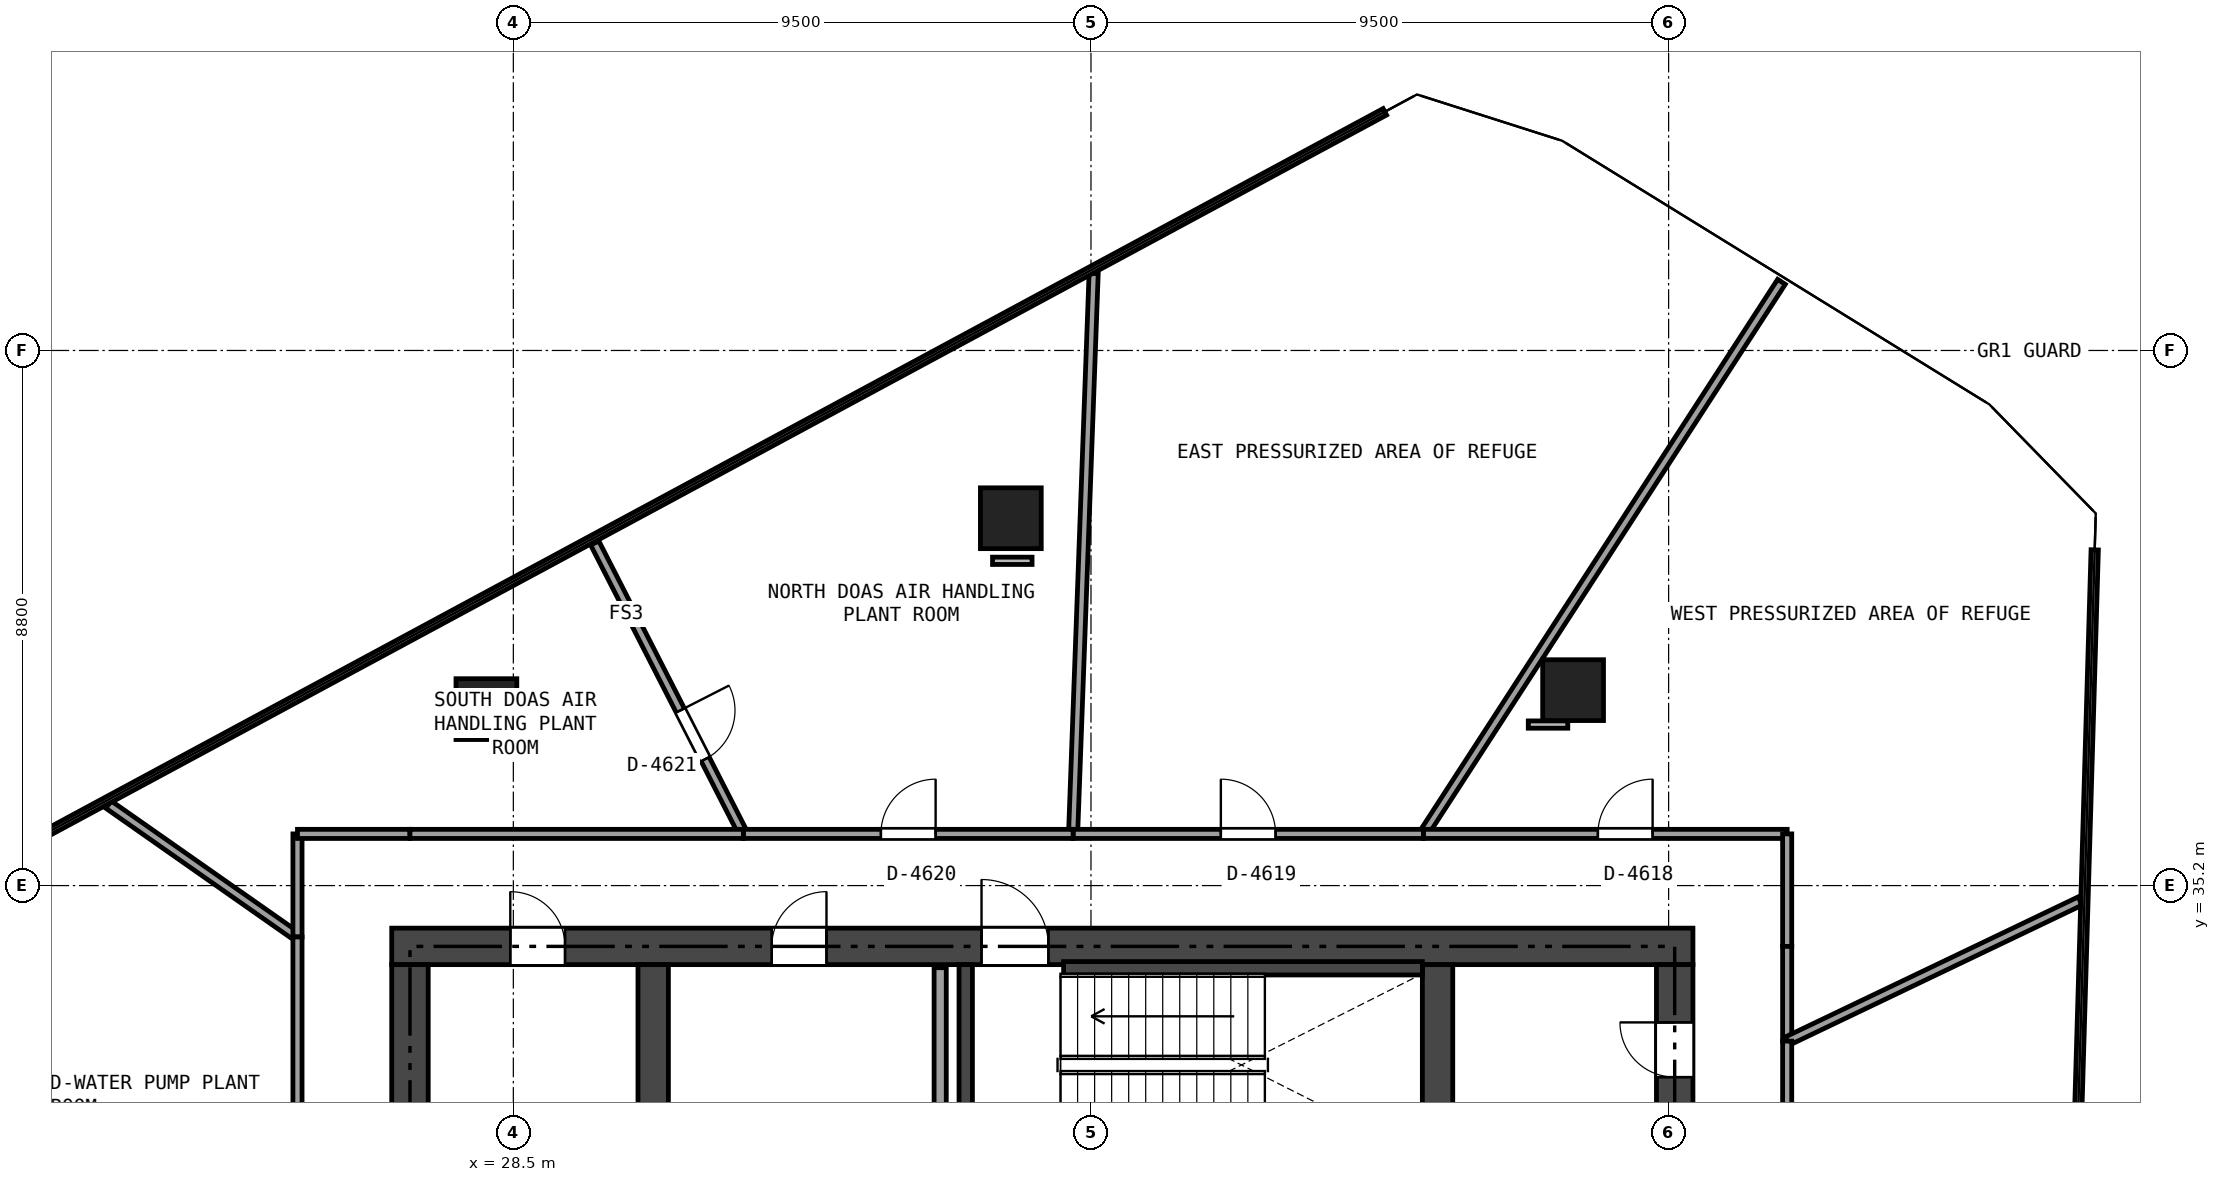
"""IFC4 building model, lengths in metres.
Left out: names, types, materials, properties, quantities, classifications, styles, units other than length and angle.
Written with IfcOpenShell. Run it as: python <this file> out.ifc"""

import sys

from ifc_helpers import new_model, si_unit, direction, frame, frame_2d, origin, origin_2d, place, context, subcontext, project, spatial, rectangle, extrude, element, fill, save


model = new_model("IFC4")
c1 = context("Model", 3, precision=1e-05, world=origin(), true_north=direction((0.0, 1.0)))
c2 = subcontext(c1, "Body", "Model", "MODEL_VIEW")
j1 = project(units=[si_unit("LENGTHUNIT", "METRE"), si_unit("PLANEANGLEUNIT", "RADIAN")], contexts=[c1])
p1 = place(None, origin())
s1 = spatial("IfcSite", under=j1, at=p1, CompositionType="ELEMENT")
p2 = place(p1, origin())
s2 = spatial("IfcBuilding", under=s1, at=p2, CompositionType="ELEMENT")
p3 = place(p2, frame((0.0, 0.0, 172.5)))
s3 = spatial("IfcBuildingStorey", under=s2, at=p3, CompositionType="ELEMENT", Elevation=172.5)
p4 = place(p3, frame((26.5, 34.2, 0.0), z_axis=(0.0, 0.0, 1.0), x_axis=(1.0, 0.0, 0.0)))
e1 = element("IfcWall", 1, at=p4, inside=s3, PredefinedType="SHEAR", context=c2, shape_type="SweptSolid", body=[
    extrude(rectangle(XDim=21.4, YDim=0.6, at=frame_2d((10.7, 0.0))), origin(), (0.0, 0.0, 1.0), 4.08),
])
p5 = place(p4, frame((9.7, 0.0, 0.0)))
e2 = element("IfcOpeningElement", 2, at=p5, cuts=e1, PredefinedType="OPENING", context=c2, shape_type="SweptSolid", body=[
    extrude(rectangle(XDim=1.1, YDim=2.15, at=frame_2d((0.55, 1.075))), frame((0.0, 0.31, 0.0), z_axis=(0.0, -1.0, 0.0), x_axis=(1.0, 0.0, 0.0)), (0.0, 0.0, 1.0), 0.62),
])
p6 = place(p4, frame((1.95, 0.0, 0.0)))
e3 = element("IfcOpeningElement", 3, at=p6, cuts=e1, PredefinedType="OPENING", context=c2, shape_type="SweptSolid", body=[
    extrude(rectangle(XDim=0.9, YDim=2.1, at=frame_2d((0.45, 1.05))), frame((0.0, 0.31, 0.0), z_axis=(0.0, -1.0, 0.0), x_axis=(1.0, 0.0, 0.0)), (0.0, 0.0, 1.0), 0.62),
])
p7 = place(p4, frame((6.25, 0.0, 0.0)))
e4 = element("IfcOpeningElement", 4, at=p7, cuts=e1, PredefinedType="OPENING", context=c2, shape_type="SweptSolid", body=[
    extrude(rectangle(XDim=0.9, YDim=2.1, at=frame_2d((0.45, 1.05))), frame((0.0, 0.31, 0.0), z_axis=(0.0, -1.0, 0.0), x_axis=(1.0, 0.0, 0.0)), (0.0, 0.0, 1.0), 0.62),
])
p8 = place(p3, frame((26.8, 18.9, 0.0), z_axis=(0.0, 0.0, 1.0), x_axis=(0.0, 1.0, 0.0)))
e5 = element("IfcWall", 5, at=p8, inside=s3, PredefinedType="SHEAR", context=c2, shape_type="SweptSolid", body=[
    extrude(rectangle(XDim=15.0, YDim=0.6, at=frame_2d((7.5, 0.0))), origin(), (0.0, 0.0, 1.0), 4.08),
])
p9 = place(p8, frame((4.6, 0.0, 0.02)))
e6 = element("IfcOpeningElement", 6, at=p9, cuts=e5, PredefinedType="OPENING", context=c2, shape_type="SweptSolid", body=[
    extrude(rectangle(XDim=0.9, YDim=2.02, at=frame_2d((0.45, 1.01))), frame((0.0, 0.31, 0.0), z_axis=(0.0, -1.0, 0.0), x_axis=(1.0, 0.0, 0.0)), (0.0, 0.0, 1.0), 0.62),
])
p10 = place(p3, frame((47.6, 18.9, 0.0), z_axis=(0.0, 0.0, 1.0), x_axis=(0.0, 1.0, 0.0)))
e7 = element("IfcWall", 7, at=p10, inside=s3, PredefinedType="SHEAR", context=c2, shape_type="SweptSolid", body=[
    extrude(rectangle(XDim=15.0, YDim=0.6, at=frame_2d((7.5, 0.0))), origin(), (0.0, 0.0, 1.0), 4.08),
])
p11 = place(p10, frame((6.6, 0.0, 0.0)))
e8 = element("IfcOpeningElement", 8, at=p11, cuts=e7, PredefinedType="OPENING", context=c2, shape_type="SweptSolid", body=[
    extrude(rectangle(XDim=1.1, YDim=2.15, at=frame_2d((0.55, 1.075))), frame((0.0, 0.31, 0.0), z_axis=(0.0, -1.0, 0.0), x_axis=(1.0, 0.0, 0.0)), (0.0, 0.0, 1.0), 0.62),
])
p12 = place(p10, frame((8.5, 0.0, 0.0)))
e9 = element("IfcOpeningElement", 9, at=p12, cuts=e7, PredefinedType="OPENING", context=c2, shape_type="SweptSolid", body=[
    extrude(rectangle(XDim=0.9, YDim=2.1, at=frame_2d((0.45, 1.05))), frame((0.0, 0.31, 0.0), z_axis=(0.0, -1.0, 0.0), x_axis=(1.0, 0.0, 0.0)), (0.0, 0.0, 1.0), 0.62),
])
p13 = place(p10, frame((13.15, 0.0, 0.0)))
e10 = element("IfcOpeningElement", 10, at=p13, cuts=e7, PredefinedType="OPENING", context=c2, shape_type="SweptSolid", body=[
    extrude(rectangle(XDim=0.9, YDim=2.1, at=frame_2d((0.45, 1.05))), frame((0.0, 0.31, 0.0), z_axis=(0.0, -1.0, 0.0), x_axis=(1.0, 0.0, 0.0)), (0.0, 0.0, 1.0), 0.62),
])
p14 = place(p3, frame((30.8, 18.9, 0.0), z_axis=(0.0, 0.0, 1.0), x_axis=(0.0, 1.0, 0.0)))
e11 = element("IfcWall", 11, at=p14, inside=s3, PredefinedType="SHEAR", context=c2, shape_type="SweptSolid", body=[
    extrude(rectangle(XDim=15.0, YDim=0.5, at=frame_2d((7.5, 0.0))), origin(), (0.0, 0.0, 1.0), 4.08),
])
p15 = place(p14, frame((6.6, 0.0, 0.0)))
e12 = element("IfcOpeningElement", 12, at=p15, cuts=e11, PredefinedType="OPENING", context=c2, shape_type="SweptSolid", body=[
    extrude(rectangle(XDim=1.1, YDim=2.15, at=frame_2d((0.55, 1.075))), frame((0.0, 0.26, 0.0), z_axis=(0.0, -1.0, 0.0), x_axis=(1.0, 0.0, 0.0)), (0.0, 0.0, 1.0), 0.52),
])
p16 = place(p14, frame((8.4, 0.0, 0.0)))
e13 = element("IfcOpeningElement", 13, at=p16, cuts=e11, PredefinedType="OPENING", context=c2, shape_type="SweptSolid", body=[
    extrude(rectangle(XDim=0.9, YDim=2.1, at=frame_2d((0.45, 1.05))), frame((0.0, 0.26, 0.0), z_axis=(0.0, -1.0, 0.0), x_axis=(1.0, 0.0, 0.0)), (0.0, 0.0, 1.0), 0.52),
])
p17 = place(p3, frame((43.7, 18.9, 0.0), z_axis=(0.0, 0.0, 1.0), x_axis=(0.0, 1.0, 0.0)))
e14 = element("IfcWall", 14, at=p17, inside=s3, PredefinedType="SHEAR", context=c2, shape_type="SweptSolid", body=[
    extrude(rectangle(XDim=15.0, YDim=0.5, at=frame_2d((7.5, 0.0))), origin(), (0.0, 0.0, 1.0), 4.08),
])
p18 = place(p17, frame((8.1, 0.0, 0.0)))
e15 = element("IfcOpeningElement", 15, at=p18, cuts=e14, PredefinedType="OPENING", context=c2, shape_type="SweptSolid", body=[
    extrude(rectangle(XDim=0.9, YDim=2.1, at=frame_2d((0.45, 1.05))), frame((0.0, 0.26, 0.0), z_axis=(0.0, -1.0, 0.0), x_axis=(1.0, 0.0, 0.0)), (0.0, 0.0, 1.0), 0.52),
])
p19 = place(p3, frame((35.94, 30.75, 0.0), z_axis=(0.0, 0.0, 1.0), x_axis=(0.0, 1.0, 0.0)))
e16 = element("IfcWall", 16, at=p19, inside=s3, PredefinedType="SHEAR", context=c2, shape_type="SweptSolid", body=[
    extrude(rectangle(XDim=3.15, YDim=0.22, at=frame_2d((1.575, 0.0))), origin(), (0.0, 0.0, 1.0), 4.08),
])
p20 = place(p3, frame((37.55, 33.84, 0.0), z_axis=(0.0, 0.0, 1.0), x_axis=(1.0, 0.0, 0.0)))
e17 = element("IfcWall", 17, at=p20, inside=s3, PredefinedType="SHEAR", context=c2, shape_type="SweptSolid", body=[
    extrude(rectangle(XDim=5.9, YDim=0.22, at=frame_2d((2.95, 0.0))), origin(), (0.0, 0.0, 1.0), 4.08),
])
for number, where, z_axis, x_axis in (
    (18, (45.929, 38.414, 0.0), (0.0, 0.0, 1.0), (1.0, 0.0, 0.0)),
    (19, (36.682, 41.241, 0.0), (0.0, 0.0, 1.0), (1.0, 0.0, 0.0)),
    (20, (28.057, 38.102, 0.0), (0.0, 0.0, 1.0), (1.0, 0.0, 0.0)),
):
    element("IfcColumn", number, at=place(p3, frame(where, z_axis=z_axis, x_axis=x_axis)), inside=s3, PredefinedType="COLUMN", context=c2, shape_type="SweptSolid", body=[
        extrude(rectangle(XDim=1.0, YDim=1.0, at=origin_2d()), origin(), (0.0, 0.0, 1.0), 4.08),
    ])
p21 = place(p3, frame((35.52, 18.95, 0.0), z_axis=(0.0, 0.0, 1.0), x_axis=(0.0, 1.0, 0.0)))
e21 = element("IfcWall", 21, at=p21, inside=s3, PredefinedType="SOLIDWALL", context=c2, shape_type="SweptSolid", body=[
    extrude(rectangle(XDim=14.9, YDim=0.2, at=frame_2d((7.45, 0.0))), origin(), (0.0, 0.0, 1.0), 3.601),
])
p22 = place(p21, frame((7.755, 0.0, 0.0)))
e22 = element("IfcOpeningElement", 22, at=p22, cuts=e21, PredefinedType="OPENING", context=c2, shape_type="SweptSolid", body=[
    extrude(rectangle(XDim=0.95, YDim=2.15, at=frame_2d((0.475, 1.075))), frame((0.0, 0.11, 0.0), z_axis=(0.0, -1.0, 0.0), x_axis=(1.0, 0.0, 0.0)), (0.0, 0.0, 1.0), 0.22),
])
p23 = place(p21, frame((0.6, 0.0, 0.0)))
e23 = element("IfcOpeningElement", 23, at=p23, cuts=e21, PredefinedType="OPENING", context=c2, shape_type="SweptSolid", body=[
    extrude(rectangle(XDim=0.9, YDim=2.1, at=frame_2d((0.45, 1.05))), frame((0.0, 0.11, 0.0), z_axis=(0.0, -1.0, 0.0), x_axis=(1.0, 0.0, 0.0)), (0.0, 0.0, 1.0), 0.22),
])
p24 = place(p3, frame((49.356, 45.129, 0.0), z_axis=(0.0, 0.0, 1.0), x_axis=(-0.544186384165, -0.838964349236, 0.0)))
e24 = element("IfcWall", 24, at=p24, inside=s3, PredefinedType="PARTITIONING", context=c2, shape_type="SweptSolid", body=[
    extrude(rectangle(XDim=10.822, YDim=0.15, at=frame_2d((5.411, 0.0))), origin(), (0.0, 0.0, 1.0), 3.565),
])
p25 = place(p3, frame((43.467, 36.05, 0.0), z_axis=(0.0, 0.0, 1.0), x_axis=(1.0, 0.0, 0.0)))
e25 = element("IfcWall", 25, at=p25, inside=s3, PredefinedType="PARTITIONING", context=c2, shape_type="SweptSolid", body=[
    extrude(rectangle(XDim=5.983, YDim=0.15, at=frame_2d((2.991, 0.0))), origin(), (0.0, 0.0, 1.0), 3.065),
])
p26 = place(p25, frame((2.87, 0.0, 0.0)))
e26 = element("IfcOpeningElement", 26, at=p26, cuts=e25, PredefinedType="OPENING", context=c2, shape_type="SweptSolid", body=[
    extrude(rectangle(XDim=0.9, YDim=2.0, at=frame_2d((0.45, 1.0))), frame((0.0, 0.085, 0.0), z_axis=(0.0, -1.0, 0.0), x_axis=(1.0, 0.0, 0.0)), (0.0, 0.0, 1.0), 0.17),
])
p27 = place(p3, frame((49.45, 36.05, 0.0), z_axis=(0.0, 0.0, 1.0), x_axis=(0.0, -1.0, 0.0)))
e27 = element("IfcWall", 27, at=p27, inside=s3, PredefinedType="PARTITIONING", context=c2, shape_type="SweptSolid", body=[
    extrude(rectangle(XDim=1.85, YDim=0.15, at=frame_2d((0.925, 0.0))), origin(), (0.0, 0.0, 1.0), 4.08),
])
p28 = place(p3, frame((49.45, 34.2, 0.0), z_axis=(0.0, 0.0, 1.0), x_axis=(0.0, -1.0, 0.0)))
e28 = element("IfcWall", 28, at=p28, inside=s3, PredefinedType="PARTITIONING", context=c2, shape_type="SweptSolid", body=[
    extrude(rectangle(XDim=1.558, YDim=0.15, at=frame_2d((0.779, 0.0))), origin(), (0.0, 0.0, 1.0), 3.565),
])
p29 = place(p3, frame((49.45, 32.642, 0.0), z_axis=(0.0, 0.0, 1.0), x_axis=(0.902160522938, 0.431400499365, 0.0)))
e29 = element("IfcWall", 29, at=p29, inside=s3, PredefinedType="PARTITIONING", context=c2, shape_type="SweptSolid", body=[
    extrude(rectangle(XDim=5.341, YDim=0.15, at=frame_2d((2.67, 0.0))), origin(), (0.0, 0.0, 1.0), 3.565),
])
p30 = place(p3, frame((38.044, 45.267, 0.0), z_axis=(0.0, 0.0, 1.0), x_axis=(-0.036634729759, -0.999328722981, 0.0)))
e30 = element("IfcWall", 30, at=p30, inside=s3, PredefinedType="PARTITIONING", context=c2, shape_type="SweptSolid", body=[
    extrude(rectangle(XDim=9.223, YDim=0.15, at=frame_2d((4.612, 0.0))), origin(), (0.0, 0.0, 1.0), 3.565),
])
p31 = place(p3, frame((37.706, 36.05, 0.0), z_axis=(0.0, 0.0, 1.0), x_axis=(1.0, 0.0, 0.0)))
e31 = element("IfcWall", 31, at=p31, inside=s3, PredefinedType="PARTITIONING", context=c2, shape_type="SweptSolid", body=[
    extrude(rectangle(XDim=5.761, YDim=0.15, at=frame_2d((2.88, 0.0))), origin(), (0.0, 0.0, 1.0), 3.601),
])
p32 = place(p31, frame((2.43, 0.0, 0.0)))
e32 = element("IfcOpeningElement", 32, at=p32, cuts=e31, PredefinedType="OPENING", context=c2, shape_type="SweptSolid", body=[
    extrude(rectangle(XDim=0.9, YDim=2.0, at=frame_2d((0.45, 1.0))), frame((0.0, 0.085, 0.0), z_axis=(0.0, -1.0, 0.0), x_axis=(1.0, 0.0, 0.0)), (0.0, 0.0, 1.0), 0.17),
])
p33 = place(p3, frame((29.839, 40.833, 0.0), z_axis=(0.0, 0.0, 1.0), x_axis=(0.454996530665, -0.890493210015, 0.0)))
e33 = element("IfcWall", 33, at=p33, inside=s3, PredefinedType="PARTITIONING", context=c2, shape_type="SweptSolid", body=[
    extrude(rectangle(XDim=5.371, YDim=0.15, at=frame_2d((2.686, 0.0))), origin(), (0.0, 0.0, 1.0), 3.565),
])
p34 = place(p33, frame((3.091, 0.0, 0.0)))
e34 = element("IfcOpeningElement", 34, at=p34, cuts=e33, PredefinedType="OPENING", context=c2, shape_type="SweptSolid", body=[
    extrude(rectangle(XDim=0.9, YDim=2.0, at=frame_2d((0.45, 1.0))), frame((0.0, 0.085, 0.0), z_axis=(0.0, -1.0, 0.0), x_axis=(1.0, 0.0, 0.0)), (0.0, 0.0, 1.0), 0.17),
])
p35 = place(p3, frame((32.283, 36.05, 0.0), z_axis=(0.0, 0.0, 1.0), x_axis=(1.0, 0.0, 0.0)))
e35 = element("IfcWall", 35, at=p35, inside=s3, PredefinedType="PARTITIONING", context=c2, shape_type="SweptSolid", body=[
    extrude(rectangle(XDim=5.423, YDim=0.15, at=frame_2d((2.711, 0.0))), origin(), (0.0, 0.0, 1.0), 3.065),
])
p36 = place(p35, frame((2.262, 0.0, 0.0)))
e36 = element("IfcOpeningElement", 36, at=p36, cuts=e35, PredefinedType="OPENING", context=c2, shape_type="SweptSolid", body=[
    extrude(rectangle(XDim=0.9, YDim=2.0, at=frame_2d((0.45, 1.0))), frame((0.0, 0.085, 0.0), z_axis=(0.0, -1.0, 0.0), x_axis=(1.0, 0.0, 0.0)), (0.0, 0.0, 1.0), 0.17),
])
p37 = place(p3, frame((21.841, 36.533, 0.0), z_axis=(0.0, 0.0, 1.0), x_axis=(0.819014305643, -0.573773097271, 0.0)))
e37 = element("IfcWall", 37, at=p37, inside=s3, PredefinedType="PARTITIONING", context=c2, shape_type="SweptSolid", body=[
    extrude(rectangle(XDim=3.796, YDim=0.15, at=frame_2d((1.898, 0.0))), origin(), (0.0, 0.0, 1.0), 4.08),
])
p38 = place(p3, frame((24.95, 34.355, 0.0), z_axis=(0.0, 0.0, 1.0), x_axis=(0.0, 1.0, 0.0)))
e38 = element("IfcWall", 38, at=p38, inside=s3, PredefinedType="PARTITIONING", context=c2, shape_type="SweptSolid", body=[
    extrude(rectangle(XDim=1.695, YDim=0.15, at=frame_2d((0.848, 0.0))), origin(), (0.0, 0.0, 1.0), 4.08),
])
p39 = place(p3, frame((24.95, 36.05, 0.0), z_axis=(0.0, 0.0, 1.0), x_axis=(1.0, 0.0, 0.0)))
e39 = element("IfcWall", 39, at=p39, inside=s3, PredefinedType="PARTITIONING", context=c2, shape_type="SweptSolid", body=[
    extrude(rectangle(XDim=1.85, YDim=0.15, at=frame_2d((0.925, 0.0))), origin(), (0.0, 0.0, 1.0), 4.08),
])
p40 = place(p3, frame((26.8, 36.05, 0.0), z_axis=(0.0, 0.0, 1.0), x_axis=(1.0, 0.0, 0.0)))
e40 = element("IfcWall", 40, at=p40, inside=s3, PredefinedType="PARTITIONING", context=c2, shape_type="SweptSolid", body=[
    extrude(rectangle(XDim=5.483, YDim=0.15, at=frame_2d((2.741, 0.0))), origin(), (0.0, 0.0, 1.0), 3.065),
])
p41 = place(p3, frame((24.95, 27.042, 0.0), z_axis=(0.0, 0.0, 1.0), x_axis=(0.0, 1.0, 0.0)))
e41 = element("IfcWall", 41, at=p41, inside=s3, PredefinedType="PARTITIONING", context=c2, shape_type="SweptSolid", body=[
    extrude(rectangle(XDim=7.313, YDim=0.15, at=frame_2d((3.656, 0.0))), origin(), (0.0, 0.0, 1.0), 3.065),
])
p42 = place(p3, frame((49.45, 32.642, 0.0), z_axis=(0.0, 0.0, 1.0), x_axis=(0.0, -1.0, 0.0)))
e42 = element("IfcWall", 42, at=p42, inside=s3, PredefinedType="PARTITIONING", context=c2, shape_type="SweptSolid", body=[
    extrude(rectangle(XDim=6.884, YDim=0.15, at=frame_2d((3.442, 0.0))), origin(), (0.0, 0.0, 1.0), 3.065),
])
p43 = place(p42, frame((2.992, 0.0, 0.0)))
e43 = element("IfcOpeningElement", 43, at=p43, cuts=e42, PredefinedType="OPENING", context=c2, shape_type="SweptSolid", body=[
    extrude(rectangle(XDim=0.9, YDim=2.0, at=frame_2d((0.45, 1.0))), frame((0.0, 0.085, 0.0), z_axis=(0.0, -1.0, 0.0), x_axis=(1.0, 0.0, 0.0)), (0.0, 0.0, 1.0), 0.17),
])
p44 = place(p5, origin())
e44 = element("IfcDoor", 44, at=p44, inside=s3, OperationType="SINGLE_SWING_LEFT", PredefinedType="DOOR", context=c2, shape_type="SweptSolid", body=[
    extrude(rectangle(XDim=1.1, YDim=2.15, at=frame_2d((0.55, 1.075))), frame((0.0, 0.025, 0.0), z_axis=(0.0, -1.0, 0.0), x_axis=(1.0, 0.0, 0.0)), (0.0, 0.0, 1.0), 0.05),
])
fill(e2, e44)
p45 = place(p6, origin())
e45 = element("IfcDoor", 45, at=p45, inside=s3, OperationType="SINGLE_SWING_LEFT", PredefinedType="DOOR", context=c2, shape_type="SweptSolid", body=[
    extrude(rectangle(XDim=0.9, YDim=2.1, at=frame_2d((0.45, 1.05))), frame((0.0, 0.025, 0.0), z_axis=(0.0, -1.0, 0.0), x_axis=(1.0, 0.0, 0.0)), (0.0, 0.0, 1.0), 0.05),
])
fill(e3, e45)
p46 = place(p7, origin())
e46 = element("IfcDoor", 46, at=p46, inside=s3, OperationType="SINGLE_SWING_RIGHT", PredefinedType="DOOR", context=c2, shape_type="SweptSolid", body=[
    extrude(rectangle(XDim=0.9, YDim=2.1, at=frame_2d((0.45, 1.05))), frame((0.0, 0.025, 0.0), z_axis=(0.0, -1.0, 0.0), x_axis=(1.0, 0.0, 0.0)), (0.0, 0.0, 1.0), 0.05),
])
fill(e4, e46)
p47 = place(p13, origin())
e47 = element("IfcDoor", 47, at=p47, inside=s3, OperationType="SINGLE_SWING_RIGHT", PredefinedType="DOOR", context=c2, shape_type="SweptSolid", body=[
    extrude(rectangle(XDim=0.9, YDim=2.1, at=frame_2d((0.45, 1.05))), frame((0.0, 0.025, 0.0), z_axis=(0.0, -1.0, 0.0), x_axis=(1.0, 0.0, 0.0)), (0.0, 0.0, 1.0), 0.05),
])
fill(e10, e47)
p48 = place(p26, origin())
e48 = element("IfcDoor", 48, at=p48, inside=s3, OperationType="SINGLE_SWING_RIGHT", PredefinedType="DOOR", context=c2, shape_type="SweptSolid", body=[
    extrude(rectangle(XDim=0.9, YDim=2.0, at=frame_2d((0.45, 1.0))), frame((0.0, 0.025, 0.0), z_axis=(0.0, -1.0, 0.0), x_axis=(1.0, 0.0, 0.0)), (0.0, 0.0, 1.0), 0.05),
])
fill(e26, e48)
p49 = place(p32, origin())
e49 = element("IfcDoor", 49, at=p49, inside=s3, OperationType="SINGLE_SWING_LEFT", PredefinedType="DOOR", context=c2, shape_type="SweptSolid", body=[
    extrude(rectangle(XDim=0.9, YDim=2.0, at=frame_2d((0.45, 1.0))), frame((0.0, 0.025, 0.0), z_axis=(0.0, -1.0, 0.0), x_axis=(1.0, 0.0, 0.0)), (0.0, 0.0, 1.0), 0.05),
])
fill(e32, e49)
p50 = place(p36, origin())
e50 = element("IfcDoor", 50, at=p50, inside=s3, OperationType="SINGLE_SWING_RIGHT", PredefinedType="DOOR", context=c2, shape_type="SweptSolid", body=[
    extrude(rectangle(XDim=0.9, YDim=2.0, at=frame_2d((0.45, 1.0))), frame((0.0, 0.025, 0.0), z_axis=(0.0, -1.0, 0.0), x_axis=(1.0, 0.0, 0.0)), (0.0, 0.0, 1.0), 0.05),
])
fill(e36, e50)
p51 = place(p34, origin())
e51 = element("IfcDoor", 51, at=p51, inside=s3, OperationType="SINGLE_SWING_LEFT", PredefinedType="DOOR", context=c2, shape_type="SweptSolid", body=[
    extrude(rectangle(XDim=0.9, YDim=2.0, at=frame_2d((0.45, 1.0))), frame((0.0, 0.025, 0.0), z_axis=(0.0, -1.0, 0.0), x_axis=(1.0, 0.0, 0.0)), (0.0, 0.0, 1.0), 0.05),
])
fill(e34, e51)
save(model, sys.argv[1])
